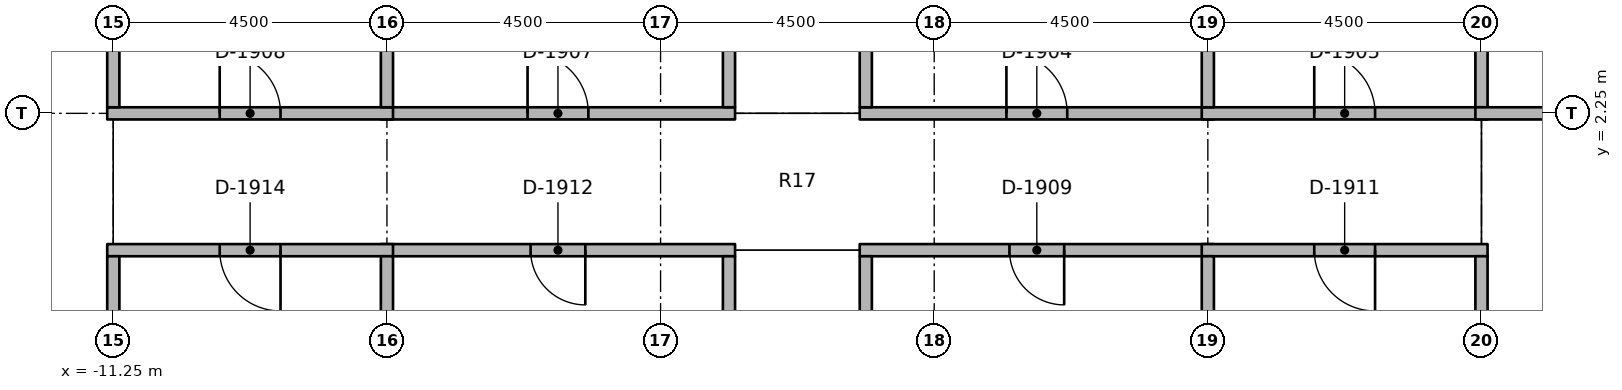
"""IFC4 building model, lengths in metres.
Left out: names, types, materials, properties, quantities, classifications, styles, units other than length and angle.
Written with IfcOpenShell. Run it as: python <this file> out.ifc"""

import sys

from ifc_helpers import new_model, si_unit, direction, frame, frame_2d, origin, place, context, subcontext, project, spatial, rectangle, extrude, element, fill, save


model = new_model("IFC4")
c1 = context("Model", 3, precision=1e-05, world=origin(), true_north=direction((0.0, 1.0)))
c2 = subcontext(c1, "Body", "Model", "MODEL_VIEW")
j1 = project(units=[si_unit("LENGTHUNIT", "METRE"), si_unit("PLANEANGLEUNIT", "RADIAN")], contexts=[c1])
p1 = place(None, origin())
s1 = spatial("IfcSite", under=j1, at=p1, CompositionType="ELEMENT")
p2 = place(p1, origin())
s2 = spatial("IfcBuilding", under=s1, at=p2, CompositionType="ELEMENT")
p3 = place(p2, frame((0.0, 0.0, 179.0)))
s3 = spatial("IfcBuildingStorey", under=s2, at=p3, CompositionType="ELEMENT", Elevation=179.0)
p4 = place(p3, frame((1.025, 2.25, 0.0), z_axis=(0.0, 0.0, 1.0), x_axis=(1.0, 0.0, 0.0)))
e1 = element("IfcWall", 1, at=p4, inside=s3, PredefinedType="PARTITIONING", context=c2, shape_type="SweptSolid", body=[
    extrude(rectangle(XDim=5.825, YDim=0.2, at=frame_2d((2.913, 0.0))), origin(), (0.0, 0.0, 1.0), 2.75),
])
p5 = place(p4, frame((2.413, 0.0, 0.0)))
e2 = element("IfcOpeningElement", 2, at=p5, cuts=e1, PredefinedType="OPENING", context=c2, shape_type="SweptSolid", body=[
    extrude(rectangle(XDim=1.0, YDim=2.1, at=frame_2d((0.5, 1.05))), frame((0.0, 0.11, 0.0), z_axis=(0.0, -1.0, 0.0), x_axis=(1.0, 0.0, 0.0)), (0.0, 0.0, 1.0), 0.22),
])
p6 = place(p3, frame((6.65, 2.25, 0.0), z_axis=(0.0, 0.0, 1.0), x_axis=(1.0, 0.0, 0.0)))
e3 = element("IfcWall", 3, at=p6, inside=s3, PredefinedType="PARTITIONING", context=c2, shape_type="SweptSolid", body=[
    extrude(rectangle(XDim=4.7, YDim=0.2, at=frame_2d((2.35, 0.0))), origin(), (0.0, 0.0, 1.0), 2.75),
])
p7 = place(p6, frame((1.85, 0.0, 0.0)))
e4 = element("IfcOpeningElement", 4, at=p7, cuts=e3, PredefinedType="OPENING", context=c2, shape_type="SweptSolid", body=[
    extrude(rectangle(XDim=1.0, YDim=2.1, at=frame_2d((0.5, 1.05))), frame((0.0, 0.11, 0.0), z_axis=(0.0, -1.0, 0.0), x_axis=(1.0, 0.0, 0.0)), (0.0, 0.0, 1.0), 0.22),
])
p8 = place(p3, frame((-6.85, 2.25, 0.0), z_axis=(0.0, 0.0, 1.0), x_axis=(1.0, 0.0, 0.0)))
e5 = element("IfcWall", 5, at=p8, inside=s3, PredefinedType="PARTITIONING", context=c2, shape_type="SweptSolid", body=[
    extrude(rectangle(XDim=5.825, YDim=0.2, at=frame_2d((2.913, 0.0))), origin(), (0.0, 0.0, 1.0), 2.75),
])
p9 = place(p8, frame((2.413, 0.0, 0.0)))
e6 = element("IfcOpeningElement", 6, at=p9, cuts=e5, PredefinedType="OPENING", context=c2, shape_type="SweptSolid", body=[
    extrude(rectangle(XDim=1.0, YDim=2.1, at=frame_2d((0.5, 1.05))), frame((0.0, 0.11, 0.0), z_axis=(0.0, -1.0, 0.0), x_axis=(1.0, 0.0, 0.0)), (0.0, 0.0, 1.0), 0.22),
])
p10 = place(p3, frame((-11.35, 2.25, 0.0), z_axis=(0.0, 0.0, 1.0), x_axis=(1.0, 0.0, 0.0)))
e7 = element("IfcWall", 7, at=p10, inside=s3, PredefinedType="PARTITIONING", context=c2, shape_type="SweptSolid", body=[
    extrude(rectangle(XDim=4.7, YDim=0.2, at=frame_2d((2.35, 0.0))), origin(), (0.0, 0.0, 1.0), 2.75),
])
p11 = place(p10, frame((1.85, 0.0, 0.0)))
e8 = element("IfcOpeningElement", 8, at=p11, cuts=e7, PredefinedType="OPENING", context=c2, shape_type="SweptSolid", body=[
    extrude(rectangle(XDim=1.0, YDim=2.1, at=frame_2d((0.5, 1.05))), frame((0.0, 0.11, 0.0), z_axis=(0.0, -1.0, 0.0), x_axis=(1.0, 0.0, 0.0)), (0.0, 0.0, 1.0), 0.22),
])
p12 = place(p3, frame((6.85, 0.0, 0.0), z_axis=(0.0, 0.0, 1.0), x_axis=(-1.0, 0.0, 0.0)))
e9 = element("IfcWall", 9, at=p12, inside=s3, PredefinedType="PARTITIONING", context=c2, shape_type="SweptSolid", body=[
    extrude(rectangle(XDim=5.825, YDim=0.2, at=frame_2d((2.913, 0.0))), origin(), (0.0, 0.0, 1.0), 2.75),
])
p13 = place(p12, frame((2.462, 0.0, 0.0)))
e10 = element("IfcOpeningElement", 10, at=p13, cuts=e9, PredefinedType="OPENING", context=c2, shape_type="SweptSolid", body=[
    extrude(rectangle(XDim=0.9, YDim=2.1, at=frame_2d((0.45, 1.05))), frame((0.0, 0.11, 0.0), z_axis=(0.0, -1.0, 0.0), x_axis=(1.0, 0.0, 0.0)), (0.0, 0.0, 1.0), 0.22),
])
p14 = place(p3, frame((11.35, 0.0, 0.0), z_axis=(0.0, 0.0, 1.0), x_axis=(-1.0, 0.0, 0.0)))
e11 = element("IfcWall", 11, at=p14, inside=s3, PredefinedType="PARTITIONING", context=c2, shape_type="SweptSolid", body=[
    extrude(rectangle(XDim=4.7, YDim=0.2, at=frame_2d((2.35, 0.0))), origin(), (0.0, 0.0, 1.0), 2.75),
])
p15 = place(p14, frame((1.85, 0.0, 0.0)))
e12 = element("IfcOpeningElement", 12, at=p15, cuts=e11, PredefinedType="OPENING", context=c2, shape_type="SweptSolid", body=[
    extrude(rectangle(XDim=1.0, YDim=2.1, at=frame_2d((0.5, 1.05))), frame((0.0, 0.11, 0.0), z_axis=(0.0, -1.0, 0.0), x_axis=(1.0, 0.0, 0.0)), (0.0, 0.0, 1.0), 0.22),
])
p16 = place(p3, frame((-1.025, 0.0, 0.0), z_axis=(0.0, 0.0, 1.0), x_axis=(-1.0, 0.0, 0.0)))
e13 = element("IfcWall", 13, at=p16, inside=s3, PredefinedType="PARTITIONING", context=c2, shape_type="SweptSolid", body=[
    extrude(rectangle(XDim=5.825, YDim=0.2, at=frame_2d((2.913, 0.0))), origin(), (0.0, 0.0, 1.0), 2.75),
])
p17 = place(p16, frame((2.462, 0.0, 0.0)))
e14 = element("IfcOpeningElement", 14, at=p17, cuts=e13, PredefinedType="OPENING", context=c2, shape_type="SweptSolid", body=[
    extrude(rectangle(XDim=0.9, YDim=2.1, at=frame_2d((0.45, 1.05))), frame((0.0, 0.11, 0.0), z_axis=(0.0, -1.0, 0.0), x_axis=(1.0, 0.0, 0.0)), (0.0, 0.0, 1.0), 0.22),
])
p18 = place(p3, frame((-6.65, 0.0, 0.0), z_axis=(0.0, 0.0, 1.0), x_axis=(-1.0, 0.0, 0.0)))
e15 = element("IfcWall", 15, at=p18, inside=s3, PredefinedType="PARTITIONING", context=c2, shape_type="SweptSolid", body=[
    extrude(rectangle(XDim=4.7, YDim=0.2, at=frame_2d((2.35, 0.0))), origin(), (0.0, 0.0, 1.0), 2.75),
])
p19 = place(p18, frame((1.85, 0.0, 0.0)))
e16 = element("IfcOpeningElement", 16, at=p19, cuts=e15, PredefinedType="OPENING", context=c2, shape_type="SweptSolid", body=[
    extrude(rectangle(XDim=1.0, YDim=2.1, at=frame_2d((0.5, 1.05))), frame((0.0, 0.11, 0.0), z_axis=(0.0, -1.0, 0.0), x_axis=(1.0, 0.0, 0.0)), (0.0, 0.0, 1.0), 0.22),
])
for number, where, z_axis, x_axis in (
    (17, (1.125, 2.35, 0.0), (0.0, 0.0, 1.0), (0.0, 1.0, 0.0)),
    (18, (-1.125, 2.35, 0.0), (0.0, 0.0, 1.0), (0.0, 1.0, 0.0)),
):
    element("IfcWall", number, at=place(p3, frame(where, z_axis=z_axis, x_axis=x_axis)), inside=s3, PredefinedType="PARTITIONING", context=c2, shape_type="SweptSolid", body=[
        extrude(rectangle(XDim=4.3, YDim=0.2, at=frame_2d((2.15, 0.0))), origin(), (0.0, 0.0, 1.0), 2.75),
    ])
for number, where, z_axis, x_axis in (
    (19, (1.125, -3.4, 0.0), (0.0, 0.0, 1.0), (0.0, 1.0, 0.0)),
    (20, (-1.125, -3.4, 0.0), (0.0, 0.0, 1.0), (0.0, 1.0, 0.0)),
):
    element("IfcWall", number, at=place(p3, frame(where, z_axis=z_axis, x_axis=x_axis)), inside=s3, PredefinedType="PARTITIONING", context=c2, shape_type="SweptSolid", body=[
        extrude(rectangle(XDim=3.3, YDim=0.2, at=frame_2d((1.65, 0.0))), origin(), (0.0, 0.0, 1.0), 2.75),
    ])
for number, where, z_axis, x_axis in (
    (21, (6.75, 2.35, 0.0), (0.0, 0.0, 1.0), (0.0, 1.0, 0.0)),
    (22, (11.25, 2.35, 0.0), (0.0, 0.0, 1.0), (0.0, 1.0, 0.0)),
    (23, (-6.75, 2.35, 0.0), (0.0, 0.0, 1.0), (0.0, 1.0, 0.0)),
):
    element("IfcWall", number, at=place(p3, frame(where, z_axis=z_axis, x_axis=x_axis)), inside=s3, PredefinedType="PARTITIONING", context=c2, shape_type="SweptSolid", body=[
        extrude(rectangle(XDim=4.3, YDim=0.2, at=frame_2d((2.15, 0.0))), origin(), (0.0, 0.0, 1.0), 2.75),
    ])
p20 = place(p3, frame((-11.25, 2.35, 0.0), z_axis=(0.0, 0.0, 1.0), x_axis=(0.0, 1.0, 0.0)))
e24 = element("IfcWall", 24, at=p20, inside=s3, PredefinedType="PARTITIONING", context=c2, shape_type="SweptSolid", body=[
    extrude(rectangle(XDim=3.82, YDim=0.2, at=frame_2d((1.91, 0.0))), origin(), (0.0, 0.0, 1.0), 2.75),
])
p21 = place(p3, frame((6.75, -3.4, 0.0), z_axis=(0.0, 0.0, 1.0), x_axis=(0.0, 1.0, 0.0)))
e25 = element("IfcWall", 25, at=p21, inside=s3, PredefinedType="PARTITIONING", context=c2, shape_type="SweptSolid", body=[
    extrude(rectangle(XDim=3.3, YDim=0.2, at=frame_2d((1.65, 0.0))), origin(), (0.0, 0.0, 1.0), 2.75),
])
p22 = place(p3, frame((11.25, -2.15, 0.0), z_axis=(0.0, 0.0, 1.0), x_axis=(0.0, 1.0, 0.0)))
e26 = element("IfcWall", 26, at=p22, inside=s3, PredefinedType="PARTITIONING", context=c2, shape_type="SweptSolid", body=[
    extrude(rectangle(XDim=2.05, YDim=0.2, at=frame_2d((1.025, 0.0))), origin(), (0.0, 0.0, 1.0), 2.75),
])
p23 = place(p3, frame((-6.75, -3.4, 0.0), z_axis=(0.0, 0.0, 1.0), x_axis=(0.0, 1.0, 0.0)))
e27 = element("IfcWall", 27, at=p23, inside=s3, PredefinedType="PARTITIONING", context=c2, shape_type="SweptSolid", body=[
    extrude(rectangle(XDim=3.3, YDim=0.2, at=frame_2d((1.65, 0.0))), origin(), (0.0, 0.0, 1.0), 2.75),
])
p24 = place(p3, frame((-11.25, -6.17, 0.0), z_axis=(0.0, 0.0, 1.0), x_axis=(0.0, 1.0, 0.0)))
e28 = element("IfcWall", 28, at=p24, inside=s3, PredefinedType="PARTITIONING", context=c2, shape_type="SweptSolid", body=[
    extrude(rectangle(XDim=6.07, YDim=0.2, at=frame_2d((3.035, 0.0))), origin(), (0.0, 0.0, 1.0), 2.75),
])
p25 = place(p3, frame((11.15, 2.25, 0.0), z_axis=(0.0, 0.0, 1.0), x_axis=(1.0, 0.0, 0.0)))
e29 = element("IfcWall", 29, at=p25, inside=s3, PredefinedType="PARTITIONING", context=c2, shape_type="SweptSolid", body=[
    extrude(rectangle(XDim=4.7, YDim=0.2, at=frame_2d((2.35, 0.0))), origin(), (0.0, 0.0, 1.0), 2.75),
])
p26 = place(p25, frame((1.85, 0.0, 0.0)))
e30 = element("IfcOpeningElement", 30, at=p26, cuts=e29, PredefinedType="OPENING", context=c2, shape_type="SweptSolid", body=[
    extrude(rectangle(XDim=1.0, YDim=2.1, at=frame_2d((0.5, 1.05))), frame((0.0, 0.11, 0.0), z_axis=(0.0, -1.0, 0.0), x_axis=(1.0, 0.0, 0.0)), (0.0, 0.0, 1.0), 0.22),
])
p27 = place(p5, origin())
e31 = element("IfcDoor", 31, at=p27, inside=s3, OperationType="SINGLE_SWING_RIGHT", PredefinedType="DOOR", context=c2, shape_type="SweptSolid", body=[
    extrude(rectangle(XDim=1.0, YDim=2.1, at=frame_2d((0.5, 1.05))), frame((0.0, 0.025, 0.0), z_axis=(0.0, -1.0, 0.0), x_axis=(1.0, 0.0, 0.0)), (0.0, 0.0, 1.0), 0.05),
])
fill(e2, e31)
p28 = place(p7, origin())
e32 = element("IfcDoor", 32, at=p28, inside=s3, OperationType="SINGLE_SWING_RIGHT", PredefinedType="DOOR", context=c2, shape_type="SweptSolid", body=[
    extrude(rectangle(XDim=1.0, YDim=2.1, at=frame_2d((0.5, 1.05))), frame((0.0, 0.025, 0.0), z_axis=(0.0, -1.0, 0.0), x_axis=(1.0, 0.0, 0.0)), (0.0, 0.0, 1.0), 0.05),
])
fill(e4, e32)
p29 = place(p9, origin())
e33 = element("IfcDoor", 33, at=p29, inside=s3, OperationType="SINGLE_SWING_RIGHT", PredefinedType="DOOR", context=c2, shape_type="SweptSolid", body=[
    extrude(rectangle(XDim=1.0, YDim=2.1, at=frame_2d((0.5, 1.05))), frame((0.0, 0.025, 0.0), z_axis=(0.0, -1.0, 0.0), x_axis=(1.0, 0.0, 0.0)), (0.0, 0.0, 1.0), 0.05),
])
fill(e6, e33)
p30 = place(p11, origin())
e34 = element("IfcDoor", 34, at=p30, inside=s3, OperationType="SINGLE_SWING_RIGHT", PredefinedType="DOOR", context=c2, shape_type="SweptSolid", body=[
    extrude(rectangle(XDim=1.0, YDim=2.1, at=frame_2d((0.5, 1.05))), frame((0.0, 0.025, 0.0), z_axis=(0.0, -1.0, 0.0), x_axis=(1.0, 0.0, 0.0)), (0.0, 0.0, 1.0), 0.05),
])
fill(e8, e34)
p31 = place(p13, origin())
e35 = element("IfcDoor", 35, at=p31, inside=s3, OperationType="SINGLE_SWING_RIGHT", PredefinedType="DOOR", context=c2, shape_type="SweptSolid", body=[
    extrude(rectangle(XDim=0.9, YDim=2.1, at=frame_2d((0.45, 1.05))), frame((0.0, 0.025, 0.0), z_axis=(0.0, -1.0, 0.0), x_axis=(1.0, 0.0, 0.0)), (0.0, 0.0, 1.0), 0.05),
])
fill(e10, e35)
p32 = place(p15, origin())
e36 = element("IfcDoor", 36, at=p32, inside=s3, OperationType="SINGLE_SWING_RIGHT", PredefinedType="DOOR", context=c2, shape_type="SweptSolid", body=[
    extrude(rectangle(XDim=1.0, YDim=2.1, at=frame_2d((0.5, 1.05))), frame((0.0, 0.025, 0.0), z_axis=(0.0, -1.0, 0.0), x_axis=(1.0, 0.0, 0.0)), (0.0, 0.0, 1.0), 0.05),
])
fill(e12, e36)
p33 = place(p17, origin())
e37 = element("IfcDoor", 37, at=p33, inside=s3, OperationType="SINGLE_SWING_RIGHT", PredefinedType="DOOR", context=c2, shape_type="SweptSolid", body=[
    extrude(rectangle(XDim=0.9, YDim=2.1, at=frame_2d((0.45, 1.05))), frame((0.0, 0.025, 0.0), z_axis=(0.0, -1.0, 0.0), x_axis=(1.0, 0.0, 0.0)), (0.0, 0.0, 1.0), 0.05),
])
fill(e14, e37)
p34 = place(p19, origin())
e38 = element("IfcDoor", 38, at=p34, inside=s3, OperationType="SINGLE_SWING_RIGHT", PredefinedType="DOOR", context=c2, shape_type="SweptSolid", body=[
    extrude(rectangle(XDim=1.0, YDim=2.1, at=frame_2d((0.5, 1.05))), frame((0.0, 0.025, 0.0), z_axis=(0.0, -1.0, 0.0), x_axis=(1.0, 0.0, 0.0)), (0.0, 0.0, 1.0), 0.05),
])
fill(e16, e38)
save(model, sys.argv[1])
